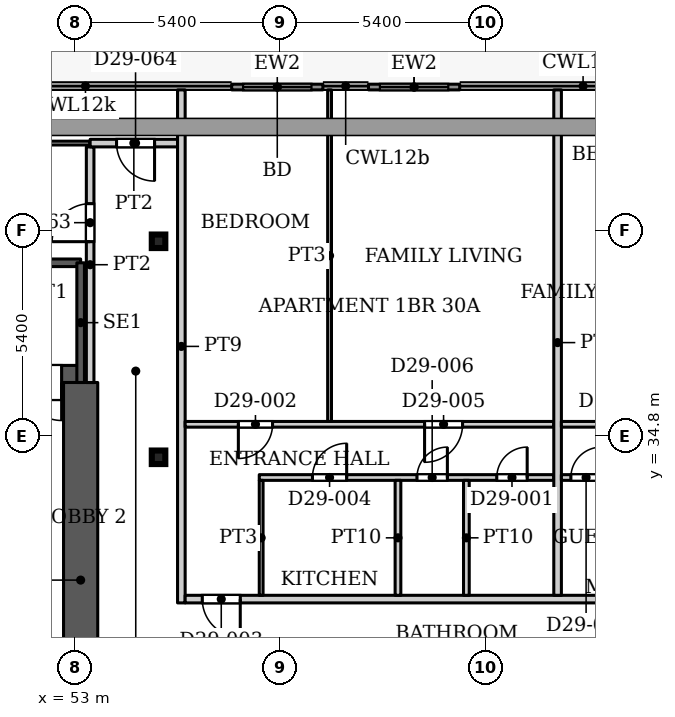
"""IFC4 building model, lengths in metres.
Left out: names, types, materials, properties, quantities, classifications, styles, units other than length and angle.
Written with IfcOpenShell. Run it as: python <this file> out.ifc"""

import sys

from ifc_helpers import new_model, si_unit, direction, frame, frame_2d, origin, origin_2d, place, context, subcontext, project, spatial, rectangle, hollow_rectangle, extrude, source, transform, mapped, element, fill, save


model = new_model("IFC4")
c1 = context("Model", 3, precision=1e-05, world=origin(), true_north=direction((0.0, 1.0)))
c2 = subcontext(c1, "Body", "Model", "MODEL_VIEW")
j1 = project(units=[si_unit("LENGTHUNIT", "METRE"), si_unit("PLANEANGLEUNIT", "RADIAN")], contexts=[c1])
p1 = place(None, origin())
s1 = spatial("IfcSite", under=j1, at=p1, CompositionType="ELEMENT")
p2 = place(p1, origin())
s2 = spatial("IfcBuilding", under=s1, at=p2, CompositionType="ELEMENT")
p3 = place(p2, frame((0.0, 0.0, 129.2)))
s3 = spatial("IfcBuildingStorey", under=s2, at=p3, CompositionType="ELEMENT", Elevation=129.2)
for number, where, z_axis, x_axis in (
    (1, (55.2, 34.232, 0.0), (0.0, 0.0, 1.0), (1.0, 0.0, 0.0)),
    (2, (55.2, 39.916, 0.0), (0.0, 0.0, 1.0), (1.0, 0.0, 0.0)),
):
    element("IfcColumn", number, at=place(p3, frame(where, z_axis=z_axis, x_axis=x_axis)), inside=s3, PredefinedType="COLUMN", context=c2, shape_type="SweptSolid", body=[
        extrude(hollow_rectangle(XDim=0.356, YDim=0.356, WallThickness=0.016, InnerFilletRadius=0.016, OuterFilletRadius=0.032, at=origin_2d()), origin(), (0.0, 0.0, 1.0), 3.9),
    ])
p4 = place(p3, frame((34.75, 36.2, 0.0), z_axis=(0.0, 0.0, 1.0), x_axis=(1.0, 0.0, 0.0)))
e3 = element("IfcWall", 3, at=p4, inside=s3, PredefinedType="SHEAR", context=c2, shape_type="SweptSolid", body=[
    extrude(rectangle(XDim=18.4, YDim=0.9, at=frame_2d((9.2, 0.0))), origin(), (0.0, 0.0, 1.0), 3.9),
])
p5 = place(p4, frame((16.9, 0.0, 0.0)))
e4 = element("IfcOpeningElement", 4, at=p5, cuts=e3, PredefinedType="OPENING", context=c2, shape_type="SweptSolid", body=[
    extrude(rectangle(XDim=1.0, YDim=2.2, at=frame_2d((0.5, 1.1))), frame((0.0, 0.46, 0.0), z_axis=(0.0, -1.0, 0.0), x_axis=(1.0, 0.0, 0.0)), (0.0, 0.0, 1.0), 0.92),
])
p6 = place(p3, frame((53.15, 25.8, 0.0), z_axis=(0.0, 0.0, 1.0), x_axis=(0.0, 1.0, 0.0)))
e5 = element("IfcWall", 5, at=p6, inside=s3, PredefinedType="SHEAR", context=c2, shape_type="SweptSolid", body=[
    extrude(rectangle(XDim=10.4, YDim=0.9, at=frame_2d((5.2, 0.0))), origin(), (0.0, 0.0, 1.0), 3.9),
])
p7 = place(p3, frame((57.124, 43.975, 0.0), z_axis=(0.0, 0.0, 1.0), x_axis=(1.0, 0.0, 0.0)))
e6 = element("IfcWall", 6, at=p7, inside=s3, PredefinedType="SOLIDWALL", context=c2, shape_type="SweptSolid", body=[
    extrude(rectangle(XDim=2.4, YDim=0.15, at=frame_2d((1.2, 0.0))), origin(), (0.0, 0.0, 1.0), 3.75),
])
p8 = place(p7, frame((0.3, 0.0, 0.0)))
e7 = element("IfcOpeningElement", 7, at=p8, cuts=e6, PredefinedType="OPENING", context=c2, shape_type="SweptSolid", body=[
    extrude(rectangle(XDim=1.8, YDim=2.4, at=frame_2d((0.9, 1.2))), frame((0.0, 0.085, 0.0), z_axis=(0.0, -1.0, 0.0), x_axis=(1.0, 0.0, 0.0)), (0.0, 0.0, 1.0), 0.17),
])
p9 = place(p3, frame((60.724, 43.975, 0.0), z_axis=(0.0, 0.0, 1.0), x_axis=(1.0, 0.0, 0.0)))
e8 = element("IfcWall", 8, at=p9, inside=s3, PredefinedType="SOLIDWALL", context=c2, shape_type="SweptSolid", body=[
    extrude(rectangle(XDim=2.4, YDim=0.15, at=frame_2d((1.2, 0.0))), origin(), (0.0, 0.0, 1.0), 3.75),
])
p10 = place(p9, frame((0.3, 0.0, 0.0)))
e9 = element("IfcOpeningElement", 9, at=p10, cuts=e8, PredefinedType="OPENING", context=c2, shape_type="SweptSolid", body=[
    extrude(rectangle(XDim=1.8, YDim=2.4, at=frame_2d((0.9, 1.2))), frame((0.0, 0.085, 0.0), z_axis=(0.0, -1.0, 0.0), x_axis=(1.0, 0.0, 0.0)), (0.0, 0.0, 1.0), 0.17),
])
p11 = place(p3, frame((43.99, 39.35, 0.0), z_axis=(0.0, 0.0, 1.0), x_axis=(1.0, 0.0, 0.0)))
e10 = element("IfcWall", 10, at=p11, inside=s3, PredefinedType="SHEAR", context=c2, shape_type="SweptSolid", body=[
    extrude(rectangle(XDim=9.16, YDim=0.2, at=frame_2d((4.58, 0.0))), origin(), (0.0, 0.0, 1.0), 3.9),
])
p12 = place(p3, frame((53.15, 36.2, 0.0), z_axis=(0.0, 0.0, 1.0), x_axis=(0.0, 1.0, 0.0)))
e11 = element("IfcWall", 11, at=p12, inside=s3, PredefinedType="SHEAR", context=c2, shape_type="SweptSolid", body=[
    extrude(rectangle(XDim=3.15, YDim=0.2, at=frame_2d((1.575, 0.0))), origin(), (0.0, 0.0, 1.0), 3.9),
])
p13 = place(p3, frame((38.449, 42.5, 0.0), z_axis=(0.0, 0.0, 1.0), x_axis=(1.0, 0.0, 0.0)))
e12 = element("IfcWall", 12, at=p13, inside=s3, PredefinedType="PARTITIONING", context=c2, shape_type="SweptSolid", body=[
    extrude(rectangle(XDim=14.951, YDim=0.1, at=frame_2d((7.476, 0.0))), origin(), (0.0, 0.0, 1.0), 3.6),
])
p14 = place(p3, frame((53.4, 36.199, 0.0), z_axis=(0.0, 0.0, 1.0), x_axis=(0.0, 1.0, 0.0)))
e13 = element("IfcWall", 13, at=p14, inside=s3, PredefinedType="PARTITIONING", context=c2, shape_type="SweptSolid", body=[
    extrude(rectangle(XDim=6.201, YDim=0.2, at=frame_2d((3.101, 0.0))), origin(), (0.0, 0.0, 1.0), 3.6),
])
p15 = place(p14, frame((3.707, 0.0, 0.0)))
e14 = element("IfcOpeningElement", 14, at=p15, cuts=e13, PredefinedType="OPENING", context=c2, shape_type="SweptSolid", body=[
    extrude(rectangle(XDim=1.0, YDim=2.1, at=frame_2d((0.5, 1.05))), frame((0.0, 0.11, 0.0), z_axis=(0.0, -1.0, 0.0), x_axis=(1.0, 0.0, 0.0)), (0.0, 0.0, 1.0), 0.22),
])
p16 = place(p3, frame((53.4, 42.5, 0.0), z_axis=(0.0, 0.0, 1.0), x_axis=(1.0, 0.0, 0.0)))
e15 = element("IfcWall", 15, at=p16, inside=s3, PredefinedType="PARTITIONING", context=c2, shape_type="SweptSolid", body=[
    extrude(rectangle(XDim=2.3, YDim=0.2, at=frame_2d((1.15, 0.0))), origin(), (0.0, 0.0, 1.0), 3.6),
])
p17 = place(p16, frame((0.695, 0.0, 0.0)))
e16 = element("IfcOpeningElement", 16, at=p17, cuts=e15, PredefinedType="OPENING", context=c2, shape_type="SweptSolid", body=[
    extrude(rectangle(XDim=1.0, YDim=2.1, at=frame_2d((0.5, 1.05))), frame((0.0, 0.11, 0.0), z_axis=(0.0, -1.0, 0.0), x_axis=(1.0, 0.0, 0.0)), (0.0, 0.0, 1.0), 0.22),
])
p18 = place(p3, frame((55.8, 30.4, 0.0), z_axis=(0.0, 0.0, 1.0), x_axis=(0.0, 1.0, 0.0)))
e17 = element("IfcWall", 17, at=p18, inside=s3, PredefinedType="PARTITIONING", context=c2, shape_type="SweptSolid", body=[
    extrude(rectangle(XDim=13.5, YDim=0.2, at=frame_2d((6.75, 0.0))), origin(), (0.0, 0.0, 1.0), 3.6),
])
p19 = place(p3, frame((55.9, 30.5, 0.0), z_axis=(0.0, 0.0, 1.0), x_axis=(1.0, 0.0, 0.0)))
e18 = element("IfcWall", 18, at=p19, inside=s3, PredefinedType="PARTITIONING", context=c2, shape_type="SweptSolid", body=[
    extrude(rectangle(XDim=42.2, YDim=0.2, at=frame_2d((21.1, 0.0))), origin(), (0.0, 0.0, 1.0), 3.6),
])
p20 = place(p19, frame((0.45, 0.0, 0.0)))
e19 = element("IfcOpeningElement", 19, at=p20, cuts=e18, PredefinedType="OPENING", context=c2, shape_type="SweptSolid", body=[
    extrude(rectangle(XDim=1.0, YDim=2.1, at=frame_2d((0.5, 1.05))), frame((0.0, 0.11, 0.0), z_axis=(0.0, -1.0, 0.0), x_axis=(1.0, 0.0, 0.0)), (0.0, 0.0, 1.0), 0.22),
])
p21 = place(p19, frame((20.1, 0.0, 0.0)))
e20 = element("IfcOpeningElement", 20, at=p21, cuts=e18, PredefinedType="OPENING", context=c2, shape_type="SweptSolid", body=[
    extrude(rectangle(XDim=1.0, YDim=2.1, at=frame_2d((0.5, 1.05))), frame((0.0, 0.11, 0.0), z_axis=(0.0, -1.0, 0.0), x_axis=(1.0, 0.0, 0.0)), (0.0, 0.0, 1.0), 0.22),
])
p22 = place(p19, frame((33.75, 0.0, 0.0)))
e21 = element("IfcOpeningElement", 21, at=p22, cuts=e18, PredefinedType="OPENING", context=c2, shape_type="SweptSolid", body=[
    extrude(rectangle(XDim=1.0, YDim=2.1, at=frame_2d((0.5, 1.05))), frame((0.0, 0.11, 0.0), z_axis=(0.0, -1.0, 0.0), x_axis=(1.0, 0.0, 0.0)), (0.0, 0.0, 1.0), 0.22),
])
p23 = place(p19, frame((38.7, 0.0, 0.0)))
e22 = element("IfcOpeningElement", 22, at=p23, cuts=e18, PredefinedType="OPENING", context=c2, shape_type="SweptSolid", body=[
    extrude(rectangle(XDim=1.0, YDim=2.1, at=frame_2d((0.5, 1.05))), frame((0.0, 0.11, 0.0), z_axis=(0.0, -1.0, 0.0), x_axis=(1.0, 0.0, 0.0)), (0.0, 0.0, 1.0), 0.22),
])
p24 = place(p3, frame((55.9, 35.1, 0.0), z_axis=(0.0, 0.0, 1.0), x_axis=(1.0, 0.0, 0.0)))
e23 = element("IfcWall", 23, at=p24, inside=s3, PredefinedType="PARTITIONING", context=c2, shape_type="SweptSolid", body=[
    extrude(rectangle(XDim=9.7, YDim=0.15, at=frame_2d((4.85, 0.0))), origin(), (0.0, 0.0, 1.0), 3.6),
])
p25 = place(p24, frame((1.4, 0.0, 0.0)))
e24 = element("IfcOpeningElement", 24, at=p25, cuts=e23, PredefinedType="OPENING", context=c2, shape_type="SweptSolid", body=[
    extrude(rectangle(XDim=0.9, YDim=2.1, at=frame_2d((0.45, 1.05))), frame((0.0, 0.085, 0.0), z_axis=(0.0, -1.0, 0.0), x_axis=(1.0, 0.0, 0.0)), (0.0, 0.0, 1.0), 0.17),
])
p26 = place(p24, frame((6.3, 0.0, 0.0)))
e25 = element("IfcOpeningElement", 25, at=p26, cuts=e23, PredefinedType="OPENING", context=c2, shape_type="SweptSolid", body=[
    extrude(rectangle(XDim=1.0, YDim=2.1, at=frame_2d((0.5, 1.05))), frame((0.0, 0.085, 0.0), z_axis=(0.0, -1.0, 0.0), x_axis=(1.0, 0.0, 0.0)), (0.0, 0.0, 1.0), 0.17),
])
p27 = place(p3, frame((57.85, 33.7, 0.0), z_axis=(0.0, 0.0, 1.0), x_axis=(1.0, 0.0, 0.0)))
e26 = element("IfcWall", 26, at=p27, inside=s3, PredefinedType="PARTITIONING", context=c2, shape_type="SweptSolid", body=[
    extrude(rectangle(XDim=7.75, YDim=0.15, at=frame_2d((3.875, 0.0))), origin(), (0.0, 0.0, 1.0), 3.6),
])
p28 = place(p27, frame((6.25, 0.0, 0.0)))
e27 = element("IfcOpeningElement", 27, at=p28, cuts=e26, PredefinedType="OPENING", context=c2, shape_type="SweptSolid", body=[
    extrude(rectangle(XDim=0.8, YDim=2.1, at=frame_2d((0.4, 1.05))), frame((0.0, 0.085, 0.0), z_axis=(0.0, -1.0, 0.0), x_axis=(1.0, 0.0, 0.0)), (0.0, 0.0, 1.0), 0.17),
])
p29 = place(p27, frame((1.4, 0.0, 0.0)))
e28 = element("IfcOpeningElement", 28, at=p29, cuts=e26, PredefinedType="OPENING", context=c2, shape_type="SweptSolid", body=[
    extrude(rectangle(XDim=0.9, YDim=2.1, at=frame_2d((0.45, 1.05))), frame((0.0, 0.085, 0.0), z_axis=(0.0, -1.0, 0.0), x_axis=(1.0, 0.0, 0.0)), (0.0, 0.0, 1.0), 0.17),
])
p30 = place(p27, frame((4.15, 0.0, 0.0)))
e29 = element("IfcOpeningElement", 29, at=p30, cuts=e26, PredefinedType="OPENING", context=c2, shape_type="SweptSolid", body=[
    extrude(rectangle(XDim=0.8, YDim=2.1, at=frame_2d((0.4, 1.05))), frame((0.0, 0.085, 0.0), z_axis=(0.0, -1.0, 0.0), x_axis=(1.0, 0.0, 0.0)), (0.0, 0.0, 1.0), 0.17),
])
p31 = place(p3, frame((57.9, 30.6, 0.0), z_axis=(0.0, 0.0, 1.0), x_axis=(0.0, 1.0, 0.0)))
e30 = element("IfcWall", 30, at=p31, inside=s3, PredefinedType="PARTITIONING", context=c2, shape_type="SweptSolid", body=[
    extrude(rectangle(XDim=3.025, YDim=0.1, at=frame_2d((1.512, 0.0))), origin(), (0.0, 0.0, 1.0), 3.6),
])
p32 = place(p3, frame((59.7, 35.175, 0.0), z_axis=(0.0, 0.0, 1.0), x_axis=(0.0, 1.0, 0.0)))
e31 = element("IfcWall", 31, at=p32, inside=s3, PredefinedType="PARTITIONING", context=c2, shape_type="SweptSolid", body=[
    extrude(rectangle(XDim=8.725, YDim=0.1, at=frame_2d((4.362, 0.0))), origin(), (0.0, 0.0, 1.0), 3.6),
])
for number, where, z_axis, x_axis in (
    (32, (61.5, 30.6, 0.0), (0.0, 0.0, 1.0), (0.0, 1.0, 0.0)),
    (33, (63.3, 30.6, 0.0), (0.0, 0.0, 1.0), (0.0, 1.0, 0.0)),
):
    element("IfcWall", number, at=place(p3, frame(where, z_axis=z_axis, x_axis=x_axis)), inside=s3, PredefinedType="PARTITIONING", context=c2, shape_type="SweptSolid", body=[
        extrude(rectangle(XDim=3.025, YDim=0.15, at=frame_2d((1.512, 0.0))), origin(), (0.0, 0.0, 1.0), 3.6),
    ])
p33 = place(p3, frame((65.7, 30.6, 0.0), z_axis=(0.0, 0.0, 1.0), x_axis=(0.0, 1.0, 0.0)))
e34 = element("IfcWall", 34, at=p33, inside=s3, PredefinedType="PARTITIONING", context=c2, shape_type="SweptSolid", body=[
    extrude(rectangle(XDim=13.3, YDim=0.2, at=frame_2d((6.65, 0.0))), origin(), (0.0, 0.0, 1.0), 3.6),
])
p34 = place(p3, frame((65.8, 33.7, 0.0), z_axis=(0.0, 0.0, 1.0), x_axis=(1.0, 0.0, 0.0)))
e35 = element("IfcWall", 35, at=p34, inside=s3, PredefinedType="PARTITIONING", context=c2, shape_type="SweptSolid", body=[
    extrude(rectangle(XDim=9.875, YDim=0.15, at=frame_2d((4.938, 0.0))), origin(), (0.0, 0.0, 1.0), 3.6),
])
p35 = place(p34, frame((8.35, 0.0, 0.0)))
e36 = element("IfcOpeningElement", 36, at=p35, cuts=e35, PredefinedType="OPENING", context=c2, shape_type="SweptSolid", body=[
    extrude(rectangle(XDim=0.8, YDim=2.1, at=frame_2d((0.4, 1.05))), frame((0.0, 0.085, 0.0), z_axis=(0.0, -1.0, 0.0), x_axis=(1.0, 0.0, 0.0)), (0.0, 0.0, 1.0), 0.17),
])
p36 = place(p34, frame((5.75, 0.0, 0.0)))
e37 = element("IfcOpeningElement", 37, at=p36, cuts=e35, PredefinedType="OPENING", context=c2, shape_type="SweptSolid", body=[
    extrude(rectangle(XDim=0.9, YDim=2.1, at=frame_2d((0.45, 1.05))), frame((0.0, 0.085, 0.0), z_axis=(0.0, -1.0, 0.0), x_axis=(1.0, 0.0, 0.0)), (0.0, 0.0, 1.0), 0.17),
])
p37 = place(p34, frame((3.6, 0.0, 0.0)))
e38 = element("IfcOpeningElement", 38, at=p37, cuts=e35, PredefinedType="OPENING", context=c2, shape_type="SweptSolid", body=[
    extrude(rectangle(XDim=0.8, YDim=2.1, at=frame_2d((0.4, 1.05))), frame((0.0, 0.085, 0.0), z_axis=(0.0, -1.0, 0.0), x_axis=(1.0, 0.0, 0.0)), (0.0, 0.0, 1.0), 0.17),
])
p38 = place(p34, frame((0.25, 0.0, 0.0)))
e39 = element("IfcOpeningElement", 39, at=p38, cuts=e35, PredefinedType="OPENING", context=c2, shape_type="SweptSolid", body=[
    extrude(rectangle(XDim=0.8, YDim=2.1, at=frame_2d((0.4, 1.05))), frame((0.0, 0.085, 0.0), z_axis=(0.0, -1.0, 0.0), x_axis=(1.0, 0.0, 0.0)), (0.0, 0.0, 1.0), 0.17),
])
p39 = place(p3, frame((65.8, 35.1, 0.0), z_axis=(0.0, 0.0, 1.0), x_axis=(1.0, 0.0, 0.0)))
e40 = element("IfcWall", 40, at=p39, inside=s3, PredefinedType="PARTITIONING", context=c2, shape_type="SweptSolid", body=[
    extrude(rectangle(XDim=15.7, YDim=0.15, at=frame_2d((7.85, 0.0))), origin(), (0.0, 0.0, 1.0), 3.6),
])
p40 = place(p39, frame((3.95, 0.0, 0.0)))
e41 = element("IfcOpeningElement", 41, at=p40, cuts=e40, PredefinedType="OPENING", context=c2, shape_type="SweptSolid", body=[
    extrude(rectangle(XDim=0.9, YDim=2.1, at=frame_2d((0.45, 1.05))), frame((0.0, 0.085, 0.0), z_axis=(0.0, -1.0, 0.0), x_axis=(1.0, 0.0, 0.0)), (0.0, 0.0, 1.0), 0.17),
])
p41 = place(p39, frame((14.0, 0.0, 0.0)))
e42 = element("IfcOpeningElement", 42, at=p41, cuts=e40, PredefinedType="OPENING", context=c2, shape_type="SweptSolid", body=[
    extrude(rectangle(XDim=0.9, YDim=2.1, at=frame_2d((0.45, 1.05))), frame((0.0, 0.085, 0.0), z_axis=(0.0, -1.0, 0.0), x_axis=(1.0, 0.0, 0.0)), (0.0, 0.0, 1.0), 0.17),
])
p42 = place(p39, frame((1.05, 0.0, 0.0)))
e43 = element("IfcOpeningElement", 43, at=p42, cuts=e40, PredefinedType="OPENING", context=c2, shape_type="SweptSolid", body=[
    extrude(rectangle(XDim=1.0, YDim=2.1, at=frame_2d((0.5, 1.05))), frame((0.0, 0.085, 0.0), z_axis=(0.0, -1.0, 0.0), x_axis=(1.0, 0.0, 0.0)), (0.0, 0.0, 1.0), 0.17),
])
p43 = place(p39, frame((10.5, 0.0, 0.0)))
e44 = element("IfcOpeningElement", 44, at=p43, cuts=e40, PredefinedType="OPENING", context=c2, shape_type="SweptSolid", body=[
    extrude(rectangle(XDim=1.6, YDim=2.1, at=frame_2d((0.8, 1.05))), frame((0.0, 0.085, 0.0), z_axis=(0.0, -1.0, 0.0), x_axis=(1.0, 0.0, 0.0)), (0.0, 0.0, 1.0), 0.17),
])
p44 = place(p39, frame((6.05, 0.0, 0.0)))
e45 = element("IfcOpeningElement", 45, at=p44, cuts=e40, PredefinedType="OPENING", context=c2, shape_type="SweptSolid", body=[
    extrude(rectangle(XDim=0.9, YDim=2.1, at=frame_2d((0.45, 1.05))), frame((0.0, 0.085, 0.0), z_axis=(0.0, -1.0, 0.0), x_axis=(1.0, 0.0, 0.0)), (0.0, 0.0, 1.0), 0.17),
])
m1 = source(origin(), c2, "Body", "SweptSolid", [
    extrude(rectangle(XDim=1.8, YDim=2.4, at=frame_2d((0.9, 1.2))), frame((0.0, 0.025, 0.0), z_axis=(0.0, -1.0, 0.0), x_axis=(1.0, 0.0, 0.0)), (0.0, 0.0, 1.0), 0.05),
])
p45 = place(p8, origin())
e46 = element("IfcDoor", 46, at=p45, inside=s3, OperationType="SLIDING_TO_LEFT", PredefinedType="DOOR", context=c2, shape_type="MappedRepresentation", body=[
    mapped(m1, transform((0.0, 0.0, 0.0), x_axis=(1.0, 0.0, 0.0), y_axis=(0.0, 1.0, 0.0), z_axis=(0.0, 0.0, 1.0), scale=1.0)),
])
fill(e7, e46)
p46 = place(p10, origin())
e47 = element("IfcDoor", 47, at=p46, inside=s3, OperationType="SLIDING_TO_LEFT", PredefinedType="DOOR", context=c2, shape_type="MappedRepresentation", body=[
    mapped(m1, transform((0.0, 0.0, 0.0), x_axis=(1.0, 0.0, 0.0), y_axis=(0.0, 1.0, 0.0), z_axis=(0.0, 0.0, 1.0), scale=1.0)),
])
fill(e9, e47)
m2 = source(origin(), c2, "Body", "SweptSolid", [
    extrude(rectangle(XDim=1.0, YDim=2.2, at=frame_2d((0.5, 1.1))), frame((0.0, 0.025, 0.0), z_axis=(0.0, -1.0, 0.0), x_axis=(1.0, 0.0, 0.0)), (0.0, 0.0, 1.0), 0.05),
])
p47 = place(p5, origin())
e48 = element("IfcDoor", 48, at=p47, inside=s3, OperationType="SINGLE_SWING_RIGHT", PredefinedType="DOOR", context=c2, shape_type="MappedRepresentation", body=[
    mapped(m2, transform((0.0, 0.0, 0.0), x_axis=(1.0, 0.0, 0.0), y_axis=(0.0, 1.0, 0.0), z_axis=(0.0, 0.0, 1.0), scale=1.0)),
])
fill(e4, e48)
m3 = source(origin(), c2, "Body", "SweptSolid", [
    extrude(rectangle(XDim=0.8, YDim=2.1, at=frame_2d((0.4, 1.05))), frame((0.0, 0.025, 0.0), z_axis=(0.0, -1.0, 0.0), x_axis=(1.0, 0.0, 0.0)), (0.0, 0.0, 1.0), 0.05),
])
p48 = place(p28, origin())
e49 = element("IfcDoor", 49, at=p48, inside=s3, OperationType="SINGLE_SWING_LEFT", PredefinedType="DOOR", context=c2, shape_type="MappedRepresentation", body=[
    mapped(m3, transform((0.0, 0.0, 0.0), x_axis=(1.0, 0.0, 0.0), y_axis=(0.0, 1.0, 0.0), z_axis=(0.0, 0.0, 1.0), scale=1.0)),
])
fill(e27, e49)
m4 = source(origin(), c2, "Body", "SweptSolid", [
    extrude(rectangle(XDim=0.9, YDim=2.1, at=frame_2d((0.45, 1.05))), frame((0.0, 0.025, 0.0), z_axis=(0.0, -1.0, 0.0), x_axis=(1.0, 0.0, 0.0)), (0.0, 0.0, 1.0), 0.05),
])
p49 = place(p25, origin())
e50 = element("IfcDoor", 50, at=p49, inside=s3, OperationType="SINGLE_SWING_RIGHT", PredefinedType="DOOR", context=c2, shape_type="MappedRepresentation", body=[
    mapped(m4, transform((0.0, 0.0, 0.0), x_axis=(1.0, 0.0, 0.0), y_axis=(0.0, 1.0, 0.0), z_axis=(0.0, 0.0, 1.0), scale=1.0)),
])
fill(e24, e50)
m5 = source(origin(), c2, "Body", "SweptSolid", [
    extrude(rectangle(XDim=1.0, YDim=2.1, at=frame_2d((0.5, 1.05))), frame((0.0, 0.025, 0.0), z_axis=(0.0, -1.0, 0.0), x_axis=(1.0, 0.0, 0.0)), (0.0, 0.0, 1.0), 0.05),
])
p50 = place(p20, origin())
e51 = element("IfcDoor", 51, at=p50, inside=s3, OperationType="SINGLE_SWING_RIGHT", PredefinedType="DOOR", context=c2, shape_type="MappedRepresentation", body=[
    mapped(m5, transform((0.0, 0.0, 0.0), x_axis=(1.0, 0.0, 0.0), y_axis=(0.0, 1.0, 0.0), z_axis=(0.0, 0.0, 1.0), scale=1.0)),
])
fill(e19, e51)
p51 = place(p29, origin())
e52 = element("IfcDoor", 52, at=p51, inside=s3, OperationType="SINGLE_SWING_LEFT", PredefinedType="DOOR", context=c2, shape_type="MappedRepresentation", body=[
    mapped(m4, transform((0.0, 0.0, 0.0), x_axis=(1.0, 0.0, 0.0), y_axis=(0.0, 1.0, 0.0), z_axis=(0.0, 0.0, 1.0), scale=1.0)),
])
fill(e28, e52)
m6 = source(origin(), c2, "Body", "SweptSolid", [
    extrude(rectangle(XDim=1.0, YDim=2.1, at=frame_2d((0.5, 1.05))), frame((0.0, 0.025, 0.0), z_axis=(0.0, -1.0, 0.0), x_axis=(1.0, 0.0, 0.0)), (0.0, 0.0, 1.0), 0.05),
])
p52 = place(p26, origin())
e53 = element("IfcDoor", 53, at=p52, inside=s3, OperationType="SINGLE_SWING_RIGHT", PredefinedType="DOOR", context=c2, shape_type="MappedRepresentation", body=[
    mapped(m6, transform((0.0, 0.0, 0.0), x_axis=(1.0, 0.0, 0.0), y_axis=(0.0, 1.0, 0.0), z_axis=(0.0, 0.0, 1.0), scale=1.0)),
])
fill(e25, e53)
p53 = place(p30, origin())
e54 = element("IfcDoor", 54, at=p53, inside=s3, OperationType="SINGLE_SWING_LEFT", PredefinedType="DOOR", context=c2, shape_type="MappedRepresentation", body=[
    mapped(m3, transform((0.0, 0.0, 0.0), x_axis=(1.0, 0.0, 0.0), y_axis=(0.0, 1.0, 0.0), z_axis=(0.0, 0.0, 1.0), scale=1.0)),
])
fill(e29, e54)
p54 = place(p38, origin())
e55 = element("IfcDoor", 55, at=p54, inside=s3, OperationType="SINGLE_SWING_LEFT", PredefinedType="DOOR", context=c2, shape_type="MappedRepresentation", body=[
    mapped(m3, transform((0.0, 0.0, 0.0), x_axis=(1.0, 0.0, 0.0), y_axis=(0.0, 1.0, 0.0), z_axis=(0.0, 0.0, 1.0), scale=1.0)),
])
fill(e39, e55)
m7 = source(origin(), c2, "Body", "SweptSolid", [
    extrude(rectangle(XDim=1.0, YDim=2.1, at=frame_2d((0.5, 1.05))), frame((0.0, 0.025, 0.0), z_axis=(0.0, -1.0, 0.0), x_axis=(1.0, 0.0, 0.0)), (0.0, 0.0, 1.0), 0.05),
])
p55 = place(p15, origin())
e56 = element("IfcDoor", 56, at=p55, inside=s3, OperationType="SINGLE_SWING_LEFT", PredefinedType="DOOR", context=c2, shape_type="MappedRepresentation", body=[
    mapped(m7, transform((0.0, 0.0, 0.0), x_axis=(1.0, 0.0, 0.0), y_axis=(0.0, 1.0, 0.0), z_axis=(0.0, 0.0, 1.0), scale=1.0)),
])
fill(e14, e56)
p56 = place(p17, origin())
e57 = element("IfcDoor", 57, at=p56, inside=s3, OperationType="SINGLE_SWING_RIGHT", PredefinedType="DOOR", context=c2, shape_type="MappedRepresentation", body=[
    mapped(m7, transform((0.0, 0.0, 0.0), x_axis=(1.0, 0.0, 0.0), y_axis=(0.0, 1.0, 0.0), z_axis=(0.0, 0.0, 1.0), scale=1.0)),
])
fill(e16, e57)
save(model, sys.argv[1])
